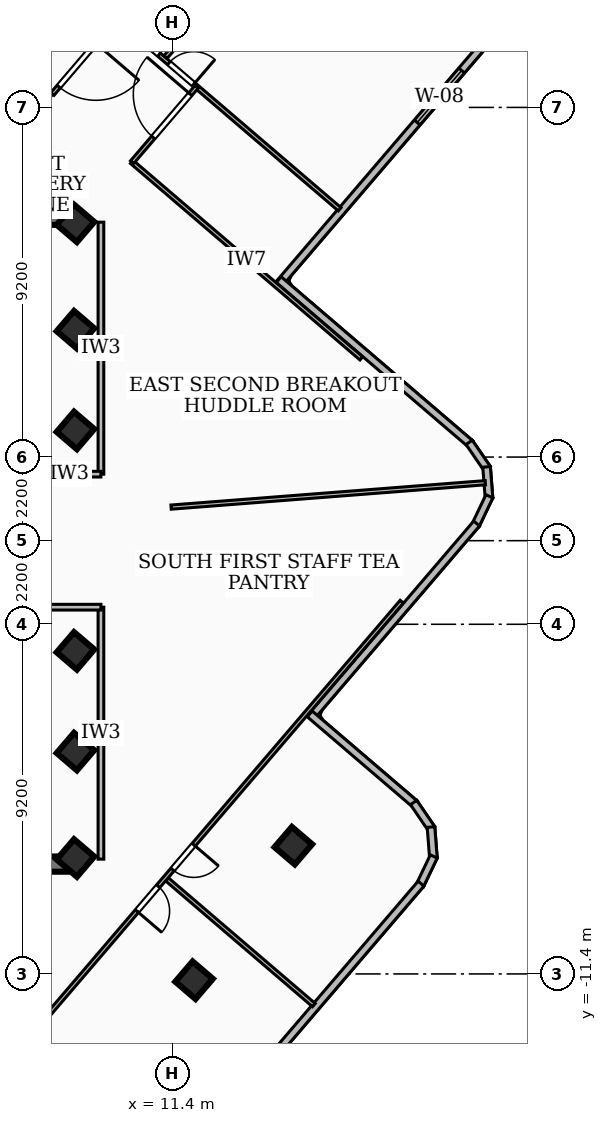
"""IFC4 building model, lengths in metres.
Left out: names, types, materials, properties, quantities, classifications, styles, units other than length and angle.
Written with IfcOpenShell. Run it as: python <this file> out.ifc"""

import sys

from ifc_helpers import new_model, si_unit, direction, frame, frame_2d, origin, origin_2d, place, context, subcontext, project, spatial, rectangle, extrude, element, fill, save


model = new_model("IFC4")
c1 = context("Model", 3, precision=1e-05, world=origin(), true_north=direction((0.0, 1.0)))
c2 = subcontext(c1, "Body", "Model", "MODEL_VIEW")
j1 = project(units=[si_unit("LENGTHUNIT", "METRE"), si_unit("PLANEANGLEUNIT", "RADIAN")], contexts=[c1])
p1 = place(None, origin())
s1 = spatial("IfcSite", under=j1, at=p1, CompositionType="ELEMENT")
p2 = place(p1, origin())
s2 = spatial("IfcBuilding", under=s1, at=p2, CompositionType="ELEMENT")
p3 = place(p2, frame((0.0, 0.0, 250.92)))
s3 = spatial("IfcBuildingStorey", under=s2, at=p3, CompositionType="ELEMENT", Elevation=250.92)
for number, where, z_axis, x_axis in (
    (1, (-8.78, 8.51, 0.0), (0.0, 0.0, 1.0), (1.0, 0.0, 0.0)),
    (2, (8.78, -8.51, 0.0), (0.0, 0.0, 1.0), (-1.0, 0.0, 0.0)),
):
    element("IfcWall", number, at=place(p3, frame(where, z_axis=z_axis, x_axis=x_axis)), inside=s3, PredefinedType="SHEAR", context=c2, shape_type="SweptSolid", body=[
        extrude(rectangle(XDim=17.56, YDim=0.4, at=frame_2d((8.78, 0.0))), origin(), (0.0, 0.0, 1.0), 3.16),
    ])
for number, where, z_axis, x_axis in (
    (3, (8.85, -5.55, 0.0), (0.0, 0.0, 1.0), (0.65, 0.76, 0.0)),
    (4, (8.85, -2.9, 0.0), (0.0, 0.0, 1.0), (0.65, 0.76, 0.0)),
    (5, (8.85, 2.9, 0.0), (0.0, 0.0, 1.0), (0.65, 0.76, 0.0)),
    (6, (8.85, 5.55, 0.0), (0.0, 0.0, 1.0), (0.65, 0.76, 0.0)),
    (7, (8.85, -8.35, 0.0), (0.0, 0.0, 1.0), (0.65, 0.76, 0.0)),
    (8, (8.85, 8.35, 0.0), (0.0, 0.0, 1.0), (0.65, 0.76, 0.0)),
    (9, (11.971, -11.566, 0.0), (0.0, 0.0, 1.0), (0.65, 0.76, 0.0)),
    (10, (14.583, -8.026, 0.0), (0.0, 0.0, 1.0), (0.65, 0.76, 0.0)),
):
    element("IfcColumn", number, at=place(p3, frame(where, z_axis=z_axis, x_axis=x_axis)), inside=s3, PredefinedType="COLUMN", context=c2, shape_type="SweptSolid", body=[
        extrude(rectangle(XDim=0.7, YDim=0.7, at=origin_2d()), origin(), (0.0, 0.0, 1.0), 3.42),
    ])
p4 = place(p3, frame((19.565, 13.017, 0.0), z_axis=(0.0, 0.0, 1.0), x_axis=(-0.650112914542, -0.759837613142, 0.0)))
e11 = element("IfcWall", 11, at=p4, inside=s3, PredefinedType="SOLIDWALL", context=c2, shape_type="SweptSolid", body=[
    extrude(rectangle(XDim=8.241, YDim=0.2, at=frame_2d((4.121, 0.0))), origin(), (0.0, 0.0, 1.0), 3.16),
])
p5 = place(p4, frame((0.85, 0.0, 0.85)))
e12 = element("IfcOpeningElement", 12, at=p5, cuts=e11, PredefinedType="OPENING", context=c2, shape_type="SweptSolid", body=[
    extrude(rectangle(XDim=1.8, YDim=1.8, at=frame_2d((0.9, 0.9))), frame((0.0, 0.11, 0.0), z_axis=(0.0, -1.0, 0.0), x_axis=(1.0, 0.0, 0.0)), (0.0, 0.0, 1.0), 0.22),
])
p6 = place(p3, frame((14.198, 6.868, 0.0), z_axis=(0.0, 0.0, 1.0), x_axis=(0.759728734939, -0.650240147413, 0.0)))
e13 = element("IfcWall", 13, at=p6, inside=s3, PredefinedType="SOLIDWALL", context=c2, shape_type="SweptSolid", body=[
    extrude(rectangle(XDim=6.64, YDim=0.2, at=frame_2d((3.32, 0.0))), origin(), (0.0, 0.0, 1.0), 3.16),
])
p7 = place(p3, frame((19.21, 2.587, 0.0), z_axis=(0.0, 0.0, 1.0), x_axis=(0.565268121329, -0.824907237821, 0.0)))
e14 = element("IfcWall", 14, at=p7, inside=s3, PredefinedType="SOLIDWALL", context=c2, shape_type="SweptSolid", body=[
    extrude(rectangle(XDim=0.839, YDim=0.2, at=frame_2d((0.419, 0.0))), origin(), (0.0, 0.0, 1.0), 3.16),
])
p8 = place(p3, frame((19.668, 1.941, 0.0), z_axis=(0.0, 0.0, 1.0), x_axis=(0.077579558977, -0.996986164412, 0.0)))
e15 = element("IfcWall", 15, at=p8, inside=s3, PredefinedType="SOLIDWALL", context=c2, shape_type="SweptSolid", body=[
    extrude(rectangle(XDim=0.824, YDim=0.2, at=frame_2d((0.412, 0.0))), origin(), (0.0, 0.0, 1.0), 3.16),
])
p9 = place(p3, frame((19.741, 1.167, 0.0), z_axis=(0.0, 0.0, 1.0), x_axis=(-0.430982405796, -0.902360330408, 0.0)))
e16 = element("IfcWall", 16, at=p9, inside=s3, PredefinedType="SOLIDWALL", context=c2, shape_type="SweptSolid", body=[
    extrude(rectangle(XDim=0.84, YDim=0.2, at=frame_2d((0.42, 0.0))), origin(), (0.0, 0.0, 1.0), 3.16),
])
p10 = place(p3, frame((19.406, 0.451, 0.0), z_axis=(0.0, 0.0, 1.0), x_axis=(-0.650185720357, -0.759775314842, 0.0)))
e17 = element("IfcWall", 17, at=p10, inside=s3, PredefinedType="SOLIDWALL", context=c2, shape_type="SweptSolid", body=[
    extrude(rectangle(XDim=6.741, YDim=0.2, at=frame_2d((3.371, 0.0))), origin(), (0.0, 0.0, 1.0), 3.16),
])
p11 = place(p3, frame((15.014, -4.558, 0.0), z_axis=(0.0, 0.0, 1.0), x_axis=(0.759781598798, -0.650178377161, 0.0)))
e18 = element("IfcWall", 18, at=p11, inside=s3, PredefinedType="SOLIDWALL", context=c2, shape_type="SweptSolid", body=[
    extrude(rectangle(XDim=3.642, YDim=0.2, at=frame_2d((1.821, 0.0))), origin(), (0.0, 0.0, 1.0), 3.16),
])
p12 = place(p3, frame((17.748, -6.889, 0.0), z_axis=(0.0, 0.0, 1.0), x_axis=(0.564140869434, -0.825678556967, 0.0)))
e19 = element("IfcWall", 19, at=p12, inside=s3, PredefinedType="SOLIDWALL", context=c2, shape_type="SweptSolid", body=[
    extrude(rectangle(XDim=0.838, YDim=0.2, at=frame_2d((0.419, 0.0))), origin(), (0.0, 0.0, 1.0), 3.16),
])
p13 = place(p3, frame((18.205, -7.535, 0.0), z_axis=(0.0, 0.0, 1.0), x_axis=(0.077579558977, -0.996986164412, 0.0)))
e20 = element("IfcWall", 20, at=p13, inside=s3, PredefinedType="SOLIDWALL", context=c2, shape_type="SweptSolid", body=[
    extrude(rectangle(XDim=0.824, YDim=0.2, at=frame_2d((0.412, 0.0))), origin(), (0.0, 0.0, 1.0), 3.16),
])
p14 = place(p3, frame((18.278, -8.309, 0.0), z_axis=(0.0, 0.0, 1.0), x_axis=(-0.431548166297, -0.902089895834, 0.0)))
e21 = element("IfcWall", 21, at=p14, inside=s3, PredefinedType="SOLIDWALL", context=c2, shape_type="SweptSolid", body=[
    extrude(rectangle(XDim=0.839, YDim=0.2, at=frame_2d((0.419, 0.0))), origin(), (0.0, 0.0, 1.0), 3.16),
])
p15 = place(p3, frame((17.943, -9.024, 0.0), z_axis=(0.0, 0.0, 1.0), x_axis=(-0.650218389303, -0.759747356831, 0.0)))
e22 = element("IfcWall", 22, at=p15, inside=s3, PredefinedType="SOLIDWALL", context=c2, shape_type="SweptSolid", body=[
    extrude(rectangle(XDim=9.723, YDim=0.2, at=frame_2d((4.861, 0.0))), origin(), (0.0, 0.0, 1.0), 3.16),
])
p16 = place(p15, frame((6.684, 0.0, 0.85)))
e23 = element("IfcOpeningElement", 23, at=p16, cuts=e22, PredefinedType="OPENING", context=c2, shape_type="SweptSolid", body=[
    extrude(rectangle(XDim=1.8, YDim=1.8, at=frame_2d((0.9, 0.9))), frame((0.0, 0.11, 0.0), z_axis=(0.0, -1.0, 0.0), x_axis=(1.0, 0.0, 0.0)), (0.0, 0.0, 1.0), 0.22),
])
p17 = place(p3, frame((9.52, 1.75, 0.0), z_axis=(0.0, 0.0, 1.0), x_axis=(0.0, 1.0, 0.0)))
e24 = element("IfcWall", 24, at=p17, inside=s3, PredefinedType="PARTITIONING", context=c2, shape_type="SweptSolid", body=[
    extrude(rectangle(XDim=6.63, YDim=0.15, at=frame_2d((3.315, 0.0))), origin(), (0.0, 0.0, 1.0), 3.16),
])
p18 = place(p3, frame((7.85, 1.75, 0.0), z_axis=(0.0, 0.0, 1.0), x_axis=(1.0, 0.0, 0.0)))
e25 = element("IfcWall", 25, at=p18, inside=s3, PredefinedType="PARTITIONING", context=c2, shape_type="SweptSolid", body=[
    extrude(rectangle(XDim=1.67, YDim=0.15, at=frame_2d((0.835, 0.0))), origin(), (0.0, 0.0, 1.0), 2.39),
])
p19 = place(p3, frame((9.52, -8.38, 0.0), z_axis=(0.0, 0.0, 1.0), x_axis=(0.0, 1.0, 0.0)))
e26 = element("IfcWall", 26, at=p19, inside=s3, PredefinedType="PARTITIONING", context=c2, shape_type="SweptSolid", body=[
    extrude(rectangle(XDim=6.63, YDim=0.15, at=frame_2d((3.315, 0.0))), origin(), (0.0, 0.0, 1.0), 2.53),
])
p20 = place(p3, frame((7.85, -1.75, 0.0), z_axis=(0.0, 0.0, 1.0), x_axis=(1.0, 0.0, 0.0)))
e27 = element("IfcWall", 27, at=p20, inside=s3, PredefinedType="PARTITIONING", context=c2, shape_type="SweptSolid", body=[
    extrude(rectangle(XDim=1.67, YDim=0.15, at=frame_2d((0.835, 0.0))), origin(), (0.0, 0.0, 1.0), 2.39),
])
p21 = place(p3, frame((11.366, 0.883, 0.0), z_axis=(0.0, 0.0, 1.0), x_axis=(0.997001087863, 0.077387536463, 0.0)))
e28 = element("IfcWall", 28, at=p21, inside=s3, PredefinedType="PARTITIONING", context=c2, shape_type="SweptSolid", body=[
    extrude(rectangle(XDim=8.294, YDim=0.11, at=frame_2d((4.147, 0.0))), origin(), (0.0, 0.0, 1.0), 3.16),
])
p22 = place(p3, frame((8.251, 11.747, 0.0), z_axis=(0.0, 0.0, 1.0), x_axis=(-0.759658945325, 0.650321679469, 0.0)))
e29 = element("IfcWall", 29, at=p22, inside=s3, PredefinedType="PARTITIONING", context=c2, shape_type="SweptSolid", body=[
    extrude(rectangle(XDim=8.05, YDim=0.11, at=frame_2d((4.025, 0.0))), origin(), (0.0, 0.0, 1.0), 3.16),
])
p23 = place(p3, frame((16.372, 4.796, 0.0), z_axis=(0.0, 0.0, 1.0), x_axis=(-0.759640163548, 0.650343618348, 0.0)))
e30 = element("IfcWall", 30, at=p23, inside=s3, PredefinedType="PARTITIONING", context=c2, shape_type="SweptSolid", body=[
    extrude(rectangle(XDim=7.95, YDim=0.11, at=frame_2d((3.975, 0.0))), origin(), (0.0, 0.0, 1.0), 2.53),
])
p24 = place(p3, frame((9.941, 13.737, 0.0), z_axis=(0.0, 0.0, 1.0), x_axis=(-0.65016721503, -0.759791150581, 0.0)))
e31 = element("IfcWall", 31, at=p24, inside=s3, PredefinedType="PARTITIONING", context=c2, shape_type="SweptSolid", body=[
    extrude(rectangle(XDim=2.61, YDim=0.11, at=frame_2d((1.305, 0.0))), origin(), (0.0, 0.0, 1.0), 2.53),
])
p25 = place(p24, frame((0.855, 0.0, 0.0)))
e32 = element("IfcOpeningElement", 32, at=p25, cuts=e31, PredefinedType="OPENING", context=c2, shape_type="SweptSolid", body=[
    extrude(rectangle(XDim=1.5, YDim=2.12, at=frame_2d((0.75, 1.06))), frame((0.0, 0.065, 0.0), z_axis=(0.0, -1.0, 0.0), x_axis=(1.0, 0.0, 0.0)), (0.0, 0.0, 1.0), 0.13),
])
p26 = place(p3, frame((10.34, 9.959, 0.0), z_axis=(0.0, 0.0, 1.0), x_axis=(0.650429323352, 0.759566781346, 0.0)))
e33 = element("IfcWall", 33, at=p26, inside=s3, PredefinedType="PARTITIONING", context=c2, shape_type="SweptSolid", body=[
    extrude(rectangle(XDim=2.611, YDim=0.11, at=frame_2d((1.305, 0.0))), origin(), (0.0, 0.0, 1.0), 2.53),
])
p27 = place(p26, frame((0.855, 0.0, 0.0)))
e34 = element("IfcOpeningElement", 34, at=p27, cuts=e33, PredefinedType="OPENING", context=c2, shape_type="SweptSolid", body=[
    extrude(rectangle(XDim=1.5, YDim=2.12, at=frame_2d((0.75, 1.06))), frame((0.0, 0.065, 0.0), z_axis=(0.0, -1.0, 0.0), x_axis=(1.0, 0.0, 0.0)), (0.0, 0.0, 1.0), 0.13),
])
p28 = place(p3, frame((11.218, 12.722, 0.0), z_axis=(0.0, 0.0, 1.0), x_axis=(0.650148936059, 0.75980679185, 0.0)))
e35 = element("IfcWall", 35, at=p28, inside=s3, PredefinedType="PARTITIONING", context=c2, shape_type="SweptSolid", body=[
    extrude(rectangle(XDim=7.075, YDim=0.11, at=frame_2d((3.538, 0.0))), origin(), (0.0, 0.0, 1.0), 3.16),
])
p29 = place(p3, frame((6.252, 16.894, 0.0), z_axis=(0.0, 0.0, 1.0), x_axis=(0.759715677597, -0.650255403063, 0.0)))
e36 = element("IfcWall", 36, at=p29, inside=s3, PredefinedType="PARTITIONING", context=c2, shape_type="SweptSolid", body=[
    extrude(rectangle(XDim=12.571, YDim=0.11, at=frame_2d((6.285, 0.0))), origin(), (0.0, 0.0, 1.0), 2.53),
])
p30 = place(p29, frame((6.655, 0.0, 0.0)))
e37 = element("IfcOpeningElement", 37, at=p30, cuts=e36, PredefinedType="OPENING", context=c2, shape_type="SweptSolid", body=[
    extrude(rectangle(XDim=0.86, YDim=2.04, at=frame_2d((0.43, 1.02))), frame((0.0, 0.065, 0.0), z_axis=(0.0, -1.0, 0.0), x_axis=(1.0, 0.0, 0.0)), (0.0, 0.0, 1.0), 0.13),
])
p31 = place(p29, frame((5.455, 0.0, 0.0)))
e38 = element("IfcOpeningElement", 38, at=p31, cuts=e36, PredefinedType="OPENING", context=c2, shape_type="SweptSolid", body=[
    extrude(rectangle(XDim=0.86, YDim=2.04, at=frame_2d((0.43, 1.02))), frame((0.0, 0.065, 0.0), z_axis=(0.0, -1.0, 0.0), x_axis=(1.0, 0.0, 0.0)), (0.0, 0.0, 1.0), 0.13),
])
p32 = place(p3, frame((11.26, -8.913, 0.0), z_axis=(0.0, 0.0, 1.0), x_axis=(0.759673292451, -0.650304919816, 0.0)))
e39 = element("IfcWall", 39, at=p32, inside=s3, PredefinedType="PARTITIONING", context=c2, shape_type="SweptSolid", body=[
    extrude(rectangle(XDim=5.085, YDim=0.11, at=frame_2d((2.542, 0.0))), origin(), (0.0, 0.0, 1.0), 3.16),
])
p33 = place(p3, frame((17.437, -1.604, 0.0), z_axis=(0.0, 0.0, 1.0), x_axis=(-0.650265099033, -0.759707378522, 0.0)))
e40 = element("IfcWall", 40, at=p33, inside=s3, PredefinedType="PARTITIONING", context=c2, shape_type="SweptSolid", body=[
    extrude(rectangle(XDim=20.139, YDim=0.11, at=frame_2d((10.07, 0.0))), origin(), (0.0, 0.0, 1.0), 2.53),
])
p34 = place(p33, frame((9.859, 0.0, 0.0)))
e41 = element("IfcOpeningElement", 41, at=p34, cuts=e40, PredefinedType="OPENING", context=c2, shape_type="SweptSolid", body=[
    extrude(rectangle(XDim=0.86, YDim=2.04, at=frame_2d((0.43, 1.02))), frame((0.0, 0.065, 0.0), z_axis=(0.0, -1.0, 0.0), x_axis=(1.0, 0.0, 0.0)), (0.0, 0.0, 1.0), 0.13),
])
p35 = place(p33, frame((8.419, 0.0, 0.0)))
e42 = element("IfcOpeningElement", 42, at=p35, cuts=e40, PredefinedType="OPENING", context=c2, shape_type="SweptSolid", body=[
    extrude(rectangle(XDim=0.86, YDim=2.04, at=frame_2d((0.43, 1.02))), frame((0.0, 0.065, 0.0), z_axis=(0.0, -1.0, 0.0), x_axis=(1.0, 0.0, 0.0)), (0.0, 0.0, 1.0), 0.13),
])
p36 = place(p5, origin())
e43 = element("IfcWindow", 43, at=p36, inside=s3, PartitioningType="SINGLE_PANEL", PredefinedType="WINDOW", context=c2, shape_type="SweptSolid", body=[
    extrude(rectangle(XDim=1.8, YDim=1.8, at=frame_2d((0.9, 0.9))), frame((0.0, 0.03, 0.0), z_axis=(0.0, -1.0, 0.0), x_axis=(1.0, 0.0, 0.0)), (0.0, 0.0, 1.0), 0.06),
])
fill(e12, e43)
p37 = place(p25, origin())
e44 = element("IfcDoor", 44, at=p37, inside=s3, OperationType="SINGLE_SWING_LEFT", PredefinedType="DOOR", context=c2, shape_type="SweptSolid", body=[
    extrude(rectangle(XDim=1.5, YDim=2.12, at=frame_2d((0.75, 1.06))), frame((0.0, 0.025, 0.0), z_axis=(0.0, -1.0, 0.0), x_axis=(1.0, 0.0, 0.0)), (0.0, 0.0, 1.0), 0.05),
])
fill(e32, e44)
p38 = place(p27, origin())
e45 = element("IfcDoor", 45, at=p38, inside=s3, OperationType="SINGLE_SWING_RIGHT", PredefinedType="DOOR", context=c2, shape_type="SweptSolid", body=[
    extrude(rectangle(XDim=1.5, YDim=2.12, at=frame_2d((0.75, 1.06))), frame((0.0, 0.025, 0.0), z_axis=(0.0, -1.0, 0.0), x_axis=(1.0, 0.0, 0.0)), (0.0, 0.0, 1.0), 0.05),
])
fill(e34, e45)
p39 = place(p30, origin())
e46 = element("IfcDoor", 46, at=p39, inside=s3, OperationType="SINGLE_SWING_RIGHT", PredefinedType="DOOR", context=c2, shape_type="SweptSolid", body=[
    extrude(rectangle(XDim=0.86, YDim=2.04, at=frame_2d((0.43, 1.02))), frame((0.0, 0.025, 0.0), z_axis=(0.0, -1.0, 0.0), x_axis=(1.0, 0.0, 0.0)), (0.0, 0.0, 1.0), 0.05),
])
fill(e37, e46)
p40 = place(p31, origin())
e47 = element("IfcDoor", 47, at=p40, inside=s3, OperationType="SINGLE_SWING_LEFT", PredefinedType="DOOR", context=c2, shape_type="SweptSolid", body=[
    extrude(rectangle(XDim=0.86, YDim=2.04, at=frame_2d((0.43, 1.02))), frame((0.0, 0.025, 0.0), z_axis=(0.0, -1.0, 0.0), x_axis=(1.0, 0.0, 0.0)), (0.0, 0.0, 1.0), 0.05),
])
fill(e38, e47)
p41 = place(p34, origin())
e48 = element("IfcDoor", 48, at=p41, inside=s3, OperationType="SINGLE_SWING_RIGHT", PredefinedType="DOOR", context=c2, shape_type="SweptSolid", body=[
    extrude(rectangle(XDim=0.86, YDim=2.04, at=frame_2d((0.43, 1.02))), frame((0.0, 0.025, 0.0), z_axis=(0.0, -1.0, 0.0), x_axis=(1.0, 0.0, 0.0)), (0.0, 0.0, 1.0), 0.05),
])
fill(e41, e48)
p42 = place(p35, origin())
e49 = element("IfcDoor", 49, at=p42, inside=s3, OperationType="SINGLE_SWING_LEFT", PredefinedType="DOOR", context=c2, shape_type="SweptSolid", body=[
    extrude(rectangle(XDim=0.86, YDim=2.04, at=frame_2d((0.43, 1.02))), frame((0.0, 0.025, 0.0), z_axis=(0.0, -1.0, 0.0), x_axis=(1.0, 0.0, 0.0)), (0.0, 0.0, 1.0), 0.05),
])
fill(e42, e49)
save(model, sys.argv[1])
